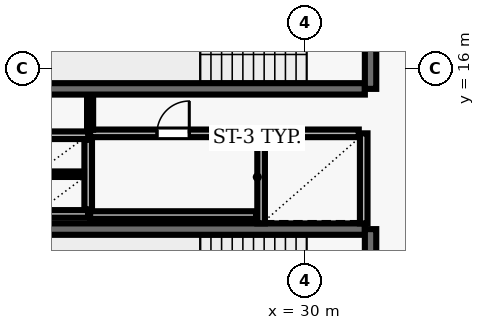
"""IFC4 building model, lengths in metres.
Left out: names, types, materials, properties, quantities, classifications, styles, units other than length and angle.
Written with IfcOpenShell. Run it as: python <this file> out.ifc"""

import sys

from ifc_helpers import new_model, si_unit, direction, frame, frame_2d, origin, place, context, subcontext, project, spatial, rectangle, extrude, element, fill, save


model = new_model("IFC4")
c1 = context("Model", 3, precision=1e-05, world=origin(), true_north=direction((0.0, 1.0)))
c2 = subcontext(c1, "Body", "Model", "MODEL_VIEW")
j1 = project(units=[si_unit("LENGTHUNIT", "METRE"), si_unit("PLANEANGLEUNIT", "RADIAN")], contexts=[c1])
p1 = place(None, origin())
s1 = spatial("IfcSite", under=j1, at=p1, CompositionType="ELEMENT")
p2 = place(p1, origin())
s2 = spatial("IfcBuilding", under=s1, at=p2, CompositionType="ELEMENT")
p3 = place(p2, frame((0.0, 0.0, 89.5)))
s3 = spatial("IfcBuildingStorey", under=s2, at=p3, CompositionType="ELEMENT", Elevation=89.5)
p4 = place(p3, frame((23.22, 15.47, 0.0), z_axis=(0.0, 0.0, 1.0), x_axis=(1.0, 0.0, 0.0)))
e1 = element("IfcWall", 1, at=p4, inside=s3, PredefinedType="SHEAR", context=c2, shape_type="SweptSolid", body=[
    extrude(rectangle(XDim=8.36, YDim=0.3, at=frame_2d((4.18, 0.0))), origin(), (0.0, 0.0, 1.0), 3.64),
])
p5 = place(p3, frame((31.73, 15.47, 0.0), z_axis=(0.0, 0.0, 1.0), x_axis=(0.0, 1.0, 0.0)))
e2 = element("IfcWall", 2, at=p5, inside=s3, PredefinedType="SHEAR", context=c2, shape_type="SweptSolid", body=[
    extrude(rectangle(XDim=3.51, YDim=0.3, at=frame_2d((1.755, 0.0))), origin(), (0.0, 0.0, 1.0), 3.64),
])
p6 = place(p5, frame((1.18, 0.0, 0.0)))
e3 = element("IfcOpeningElement", 3, at=p6, cuts=e2, PredefinedType="OPENING", context=c2, shape_type="SweptSolid", body=[
    extrude(rectangle(XDim=1.15, YDim=2.15, at=frame_2d((0.575, 1.075))), frame((0.0, 0.16, 0.0), z_axis=(0.0, -1.0, 0.0), x_axis=(1.0, 0.0, 0.0)), (0.0, 0.0, 1.0), 0.32),
])
p7 = place(p3, frame((31.58, 11.78, 0.0), z_axis=(0.0, 0.0, 1.0), x_axis=(-1.0, 0.0, 0.0)))
e4 = element("IfcWall", 4, at=p7, inside=s3, PredefinedType="SHEAR", context=c2, shape_type="SweptSolid", body=[
    extrude(rectangle(XDim=8.36, YDim=0.3, at=frame_2d((4.18, 0.0))), origin(), (0.0, 0.0, 1.0), 3.64),
])
p8 = place(p3, frame((31.73, 8.27, 0.0), z_axis=(0.0, 0.0, 1.0), x_axis=(0.0, 1.0, 0.0)))
e5 = element("IfcWall", 5, at=p8, inside=s3, PredefinedType="SHEAR", context=c2, shape_type="SweptSolid", body=[
    extrude(rectangle(XDim=3.51, YDim=0.3, at=frame_2d((1.755, 0.0))), origin(), (0.0, 0.0, 1.0), 3.64),
])
p9 = place(p8, frame((1.18, 0.0, 0.0)))
e6 = element("IfcOpeningElement", 6, at=p9, cuts=e5, PredefinedType="OPENING", context=c2, shape_type="SweptSolid", body=[
    extrude(rectangle(XDim=1.15, YDim=2.15, at=frame_2d((0.575, 1.075))), frame((0.0, 0.16, 0.0), z_axis=(0.0, -1.0, 0.0), x_axis=(1.0, 0.0, 0.0)), (0.0, 0.0, 1.0), 0.32),
])
for number, where, z_axis, x_axis in (
    (7, (28.85, 14.3, 0.0), (0.0, 0.0, 1.0), (0.0, -1.0, 0.0)),
    (8, (31.55, 11.93, 0.0), (0.0, 0.0, 1.0), (0.0, 1.0, 0.0)),
):
    element("IfcWall", number, at=place(p3, frame(where, z_axis=z_axis, x_axis=x_axis)), inside=s3, PredefinedType="SOLIDWALL", context=c2, shape_type="SweptSolid", body=[
        extrude(rectangle(XDim=2.37, YDim=0.2, at=frame_2d((1.185, 0.0))), origin(), (0.0, 0.0, 1.0), 3.64),
    ])
p10 = place(p3, frame((31.42, 14.3, 0.0), z_axis=(0.0, 0.0, 1.0), x_axis=(-1.0, 0.0, 0.0)))
e9 = element("IfcWall", 9, at=p10, inside=s3, PredefinedType="SOLIDWALL", context=c2, shape_type="SweptSolid", body=[
    extrude(rectangle(XDim=2.44, YDim=0.2, at=frame_2d((1.22, 0.0))), origin(), (0.0, 0.0, 1.0), 3.64),
])
for number, where, z_axis, x_axis in (
    (10, (22.9, 14.25, 0.0), (0.0, 0.0, 1.0), (1.0, 0.0, 0.0)),
    (11, (22.9, 12.18, 0.0), (0.0, 0.0, 1.0), (1.0, 0.0, 0.0)),
):
    element("IfcWall", number, at=place(p3, frame(where, z_axis=z_axis, x_axis=x_axis)), inside=s3, PredefinedType="SOLIDWALL", context=c2, shape_type="SweptSolid", body=[
        extrude(rectangle(XDim=1.4, YDim=0.2, at=frame_2d((0.7, 0.0))), origin(), (0.0, 0.0, 1.0), 3.64),
    ])
p11 = place(p3, frame((24.3, 12.3, 0.0), z_axis=(0.0, 0.0, 1.0), x_axis=(0.0, 1.0, 0.0)))
e12 = element("IfcWall", 12, at=p11, inside=s3, PredefinedType="SOLIDWALL", context=c2, shape_type="SweptSolid", body=[
    extrude(rectangle(XDim=1.83, YDim=0.2, at=frame_2d((0.915, 0.0))), origin(), (0.0, 0.0, 1.0), 3.64),
])
p12 = place(p3, frame((23.01, 13.225, 0.0), z_axis=(0.0, 0.0, 1.0), x_axis=(1.0, 0.0, 0.0)))
e13 = element("IfcWall", 13, at=p12, inside=s3, PredefinedType="PARTITIONING", context=c2, shape_type="SweptSolid", body=[
    extrude(rectangle(XDim=1.18, YDim=0.145, at=frame_2d((0.59, 0.0))), origin(), (0.0, 0.0, 1.0), 3.64),
])
p13 = place(p3, frame((24.35, 12.15, 0.0), z_axis=(0.0, 0.0, 1.0), x_axis=(1.0, 0.0, 0.0)))
e14 = element("IfcWall", 14, at=p13, inside=s3, PredefinedType="SOLIDWALL", context=c2, shape_type="SweptSolid", body=[
    extrude(rectangle(XDim=4.37, YDim=0.2, at=frame_2d((2.185, 0.0))), origin(), (0.0, 0.0, 1.0), 3.64),
])
p14 = place(p3, frame((24.35, 14.3, 0.0), z_axis=(0.0, 0.0, 1.0), x_axis=(1.0, 0.0, 0.0)))
e15 = element("IfcWall", 15, at=p14, inside=s3, PredefinedType="SOLIDWALL", context=c2, shape_type="SweptSolid", body=[
    extrude(rectangle(XDim=4.37, YDim=0.2, at=frame_2d((2.185, 0.0))), origin(), (0.0, 0.0, 1.0), 3.64),
])
p15 = place(p14, frame((1.76, 0.0, 0.0)))
e16 = element("IfcOpeningElement", 16, at=p15, cuts=e15, PredefinedType="OPENING", context=c2, shape_type="SweptSolid", body=[
    extrude(rectangle(XDim=0.85, YDim=2.1, at=frame_2d((0.425, 1.05))), frame((0.0, 0.11, 0.0), z_axis=(0.0, -1.0, 0.0), x_axis=(1.0, 0.0, 0.0)), (0.0, 0.0, 1.0), 0.22),
])
p16 = place(p3, frame((24.35, 15.29, 0.0), z_axis=(0.0, 0.0, 1.0), x_axis=(0.0, -1.0, 0.0)))
e17 = element("IfcWall", 17, at=p16, inside=s3, PredefinedType="PARTITIONING", context=c2, shape_type="SweptSolid", body=[
    extrude(rectangle(XDim=0.895, YDim=0.16, at=frame_2d((0.448, 0.0))), origin(), (0.0, 0.0, 1.0), 3.64),
])
p17 = place(p15, origin())
e18 = element("IfcDoor", 18, at=p17, inside=s3, OperationType="SINGLE_SWING_RIGHT", PredefinedType="DOOR", context=c2, shape_type="SweptSolid", body=[
    extrude(rectangle(XDim=0.85, YDim=2.1, at=frame_2d((0.425, 1.05))), frame((0.0, 0.025, 0.0), z_axis=(0.0, -1.0, 0.0), x_axis=(1.0, 0.0, 0.0)), (0.0, 0.0, 1.0), 0.05),
])
fill(e16, e18)
save(model, sys.argv[1])
